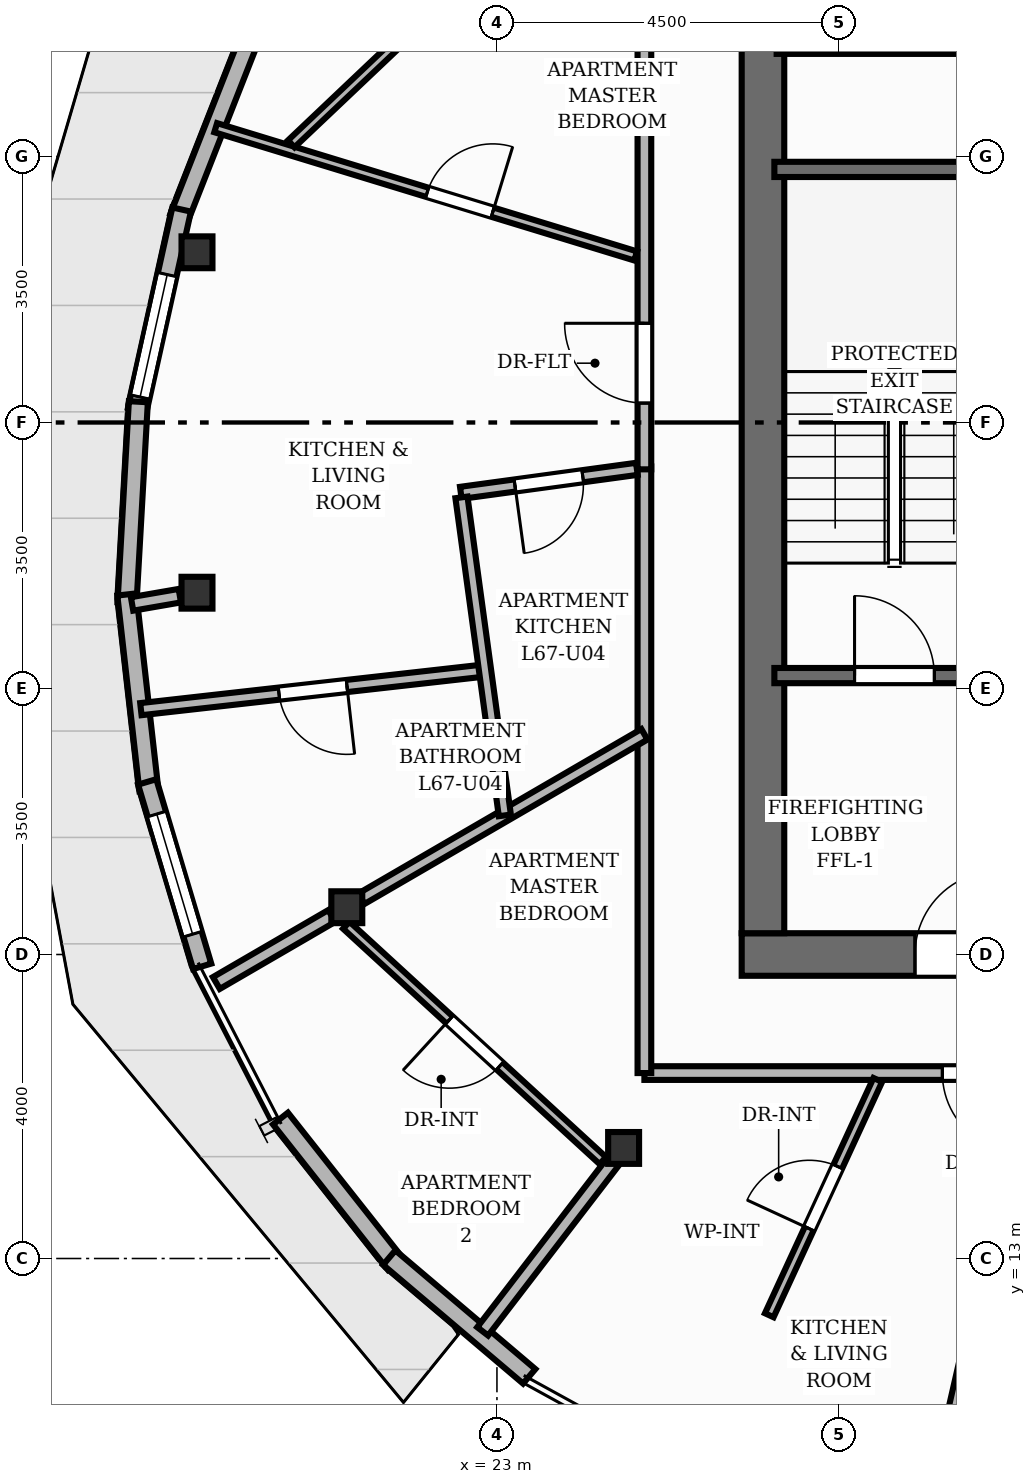
"""IFC4 building model, lengths in metres.
Left out: names, types, materials, properties, quantities, classifications, styles, units other than length and angle.
Written with IfcOpenShell. Run it as: python <this file> out.ifc"""

import sys

from ifc_helpers import new_model, si_unit, direction, frame, frame_2d, origin, origin_2d, place, context, subcontext, project, spatial, rectangle, i_section, extrude, element, fill, save


model = new_model("IFC4")
c1 = context("Model", 3, precision=1e-05, world=origin(), true_north=direction((0.0, 1.0)))
c2 = subcontext(c1, "Body", "Model", "MODEL_VIEW")
j1 = project(units=[si_unit("LENGTHUNIT", "METRE"), si_unit("PLANEANGLEUNIT", "RADIAN")], contexts=[c1])
p1 = place(None, origin())
s1 = spatial("IfcSite", under=j1, at=p1, CompositionType="ELEMENT")
p2 = place(p1, origin())
s2 = spatial("IfcBuilding", under=s1, at=p2, CompositionType="ELEMENT")
p3 = place(p2, frame((0.0, 0.0, 223.84)))
s3 = spatial("IfcBuildingStorey", under=s2, at=p3, CompositionType="ELEMENT", Elevation=223.84)
p4 = place(p3, frame((26.22, 17.0, 0.0), z_axis=(0.0, 0.0, 1.0), x_axis=(1.0, 0.0, 0.0)))
e1 = element("IfcWall", 1, at=p4, inside=s3, PredefinedType="SHEAR", context=c2, shape_type="SweptSolid", body=[
    extrude(rectangle(XDim=11.56, YDim=0.56, at=frame_2d((5.78, 0.0))), origin(), (0.0, 0.0, 1.0), 3.2),
])
p5 = place(p4, frame((2.28, 0.0, 0.0)))
e2 = element("IfcOpeningElement", 2, at=p5, cuts=e1, PredefinedType="OPENING", context=c2, shape_type="SweptSolid", body=[
    extrude(rectangle(XDim=1.1, YDim=2.15, at=frame_2d((0.55, 1.075))), frame((0.0, 0.29, 0.0), z_axis=(0.0, -1.0, 0.0), x_axis=(1.0, 0.0, 0.0)), (0.0, 0.0, 1.0), 0.58),
])
p6 = place(p4, frame((5.83, 0.0, 0.0)))
e3 = element("IfcOpeningElement", 3, at=p6, cuts=e1, PredefinedType="OPENING", context=c2, shape_type="SweptSolid", body=[
    extrude(rectangle(XDim=0.9, YDim=2.1, at=frame_2d((0.45, 1.05))), frame((0.0, 0.29, 0.0), z_axis=(0.0, -1.0, 0.0), x_axis=(1.0, 0.0, 0.0)), (0.0, 0.0, 1.0), 0.58),
])
p7 = place(p3, frame((26.5, 17.28, 0.0), z_axis=(0.0, 0.0, 1.0), x_axis=(0.0, 1.0, 0.0)))
e4 = element("IfcWall", 4, at=p7, inside=s3, PredefinedType="SHEAR", context=c2, shape_type="SweptSolid", body=[
    extrude(rectangle(XDim=13.44, YDim=0.56, at=frame_2d((6.72, 0.0))), origin(), (0.0, 0.0, 1.0), 3.2),
])
for number, where, z_axis, x_axis in (
    (5, (19.054, 26.24, 0.0), (0.0, 0.0, 1.0), (1.0, 0.0, 0.0)),
    (6, (19.054, 21.76, 0.0), (0.0, 0.0, 1.0), (1.0, 0.0, 0.0)),
    (7, (21.025, 17.622, 0.0), (0.0, 0.0, 1.0), (1.0, 0.0, 0.0)),
    (8, (24.667, 14.455, 0.0), (0.0, 0.0, 1.0), (1.0, 0.0, 0.0)),
):
    element("IfcColumn", number, at=place(p3, frame(where, z_axis=z_axis, x_axis=x_axis)), inside=s3, PredefinedType="COLUMN", context=c2, shape_type="SweptSolid", body=[
        extrude(i_section(OverallWidth=0.407, OverallDepth=0.419, WebThickness=0.031, FlangeThickness=0.049, at=origin_2d()), origin(), (0.0, 0.0, 1.0), 3.2),
    ])
p8 = place(p3, frame((18.82, 26.698, 0.0), z_axis=(0.0, 0.0, 1.0), x_axis=(0.365588934877, 0.930776412838, 0.0)))
e9 = element("IfcWall", 9, at=p8, inside=s3, PredefinedType="SOLIDWALL", context=c2, shape_type="SweptSolid", body=[
    extrude(rectangle(XDim=2.739, YDim=0.25, at=frame_2d((1.369, 0.0))), origin(), (0.0, 0.0, 1.0), 2.577),
])
p9 = place(p3, frame((18.267, 24.164, 0.0), z_axis=(0.0, 0.0, 1.0), x_axis=(0.21633718885, 0.976318708579, 0.0)))
e10 = element("IfcWall", 10, at=p9, inside=s3, PredefinedType="SOLIDWALL", context=c2, shape_type="SweptSolid", body=[
    extrude(rectangle(XDim=2.702, YDim=0.25, at=frame_2d((1.351, 0.0))), origin(), (0.0, 0.0, 1.0), 2.577),
])
p10 = place(p9, frame((0.175, 0.0, 0.85)))
e11 = element("IfcOpeningElement", 11, at=p10, cuts=e10, PredefinedType="OPENING", context=c2, shape_type="SweptSolid", body=[
    extrude(rectangle(XDim=1.65, YDim=1.55, at=frame_2d((0.825, 0.775))), frame((0.0, 0.135, 0.0), z_axis=(0.0, -1.0, 0.0), x_axis=(1.0, 0.0, 0.0)), (0.0, 0.0, 1.0), 0.27),
])
p11 = place(p3, frame((18.133, 21.626, 0.0), z_axis=(0.0, 0.0, 1.0), x_axis=(0.056270814174, 0.998415542483, 0.0)))
e12 = element("IfcWall", 12, at=p11, inside=s3, PredefinedType="SOLIDWALL", context=c2, shape_type="SweptSolid", body=[
    extrude(rectangle(XDim=2.651, YDim=0.25, at=frame_2d((1.325, 0.0))), origin(), (0.0, 0.0, 1.0), 2.96),
])
p12 = place(p3, frame((18.421, 19.161, 0.0), z_axis=(0.0, 0.0, 1.0), x_axis=(-0.112260931198, 0.993678762642, 0.0)))
e13 = element("IfcWall", 13, at=p12, inside=s3, PredefinedType="SOLIDWALL", context=c2, shape_type="SweptSolid", body=[
    extrude(rectangle(XDim=2.592, YDim=0.25, at=frame_2d((1.296, 0.0))), origin(), (0.0, 0.0, 1.0), 2.96),
])
p13 = place(p3, frame((19.122, 16.844, 0.0), z_axis=(0.0, 0.0, 1.0), x_axis=(-0.285604720301, 0.958347506775, 0.0)))
e14 = element("IfcWall", 14, at=p13, inside=s3, PredefinedType="SOLIDWALL", context=c2, shape_type="SweptSolid", body=[
    extrude(rectangle(XDim=2.532, YDim=0.25, at=frame_2d((1.266, 0.0))), origin(), (0.0, 0.0, 1.0), 2.96),
])
p14 = place(p13, frame((0.441, 0.0, 0.85)))
e15 = element("IfcOpeningElement", 15, at=p14, cuts=e14, PredefinedType="OPENING", context=c2, shape_type="SweptSolid", body=[
    extrude(rectangle(XDim=1.65, YDim=1.55, at=frame_2d((0.825, 0.775))), frame((0.0, 0.135, 0.0), z_axis=(0.0, -1.0, 0.0), x_axis=(1.0, 0.0, 0.0)), (0.0, 0.0, 1.0), 0.27),
])
p15 = place(p3, frame((21.663, 12.929, 0.0), z_axis=(0.0, 0.0, 1.0), x_axis=(-0.619881401672, 0.784695512833, 0.0)))
e16 = element("IfcWall", 16, at=p15, inside=s3, PredefinedType="SOLIDWALL", context=c2, shape_type="SweptSolid", body=[
    extrude(rectangle(XDim=2.437, YDim=0.25, at=frame_2d((1.218, 0.0))), origin(), (0.0, 0.0, 1.0), 2.96),
])
p16 = place(p3, frame((23.425, 11.45, 0.0), z_axis=(0.0, 0.0, 1.0), x_axis=(-0.762614923672, 0.646852748462, 0.0)))
e17 = element("IfcWall", 17, at=p16, inside=s3, PredefinedType="SOLIDWALL", context=c2, shape_type="SweptSolid", body=[
    extrude(rectangle(XDim=2.415, YDim=0.25, at=frame_2d((1.208, 0.0))), origin(), (0.0, 0.0, 1.0), 2.96),
])
p17 = place(p3, frame((26.65, 27.33, 0.0), z_axis=(0.0, 0.0, 1.0), x_axis=(1.0, 0.0, 0.0)))
e18 = element("IfcWall", 18, at=p17, inside=s3, PredefinedType="SHEAR", context=c2, shape_type="SweptSolid", body=[
    extrude(rectangle(XDim=3.24, YDim=0.2, at=frame_2d((1.62, 0.0))), origin(), (0.0, 0.0, 1.0), 3.2),
])
p18 = place(p3, frame((26.65, 20.67, 0.0), z_axis=(0.0, 0.0, 1.0), x_axis=(1.0, 0.0, 0.0)))
e19 = element("IfcWall", 19, at=p18, inside=s3, PredefinedType="SHEAR", context=c2, shape_type="SweptSolid", body=[
    extrude(rectangle(XDim=3.24, YDim=0.2, at=frame_2d((1.62, 0.0))), origin(), (0.0, 0.0, 1.0), 3.2),
])
p19 = place(p18, frame((1.055, 0.0, 0.0)))
e20 = element("IfcOpeningElement", 20, at=p19, cuts=e19, PredefinedType="OPENING", context=c2, shape_type="SweptSolid", body=[
    extrude(rectangle(XDim=1.05, YDim=2.15, at=frame_2d((0.525, 1.075))), frame((0.0, 0.11, 0.0), z_axis=(0.0, -1.0, 0.0), x_axis=(1.0, 0.0, 0.0)), (0.0, 0.0, 1.0), 0.22),
])
p20 = place(p3, frame((26.68, 28.95, 0.0), z_axis=(0.0, 0.0, 1.0), x_axis=(1.0, 0.0, 0.0)))
e21 = element("IfcWall", 21, at=p20, inside=s3, PredefinedType="SHEAR", context=c2, shape_type="SweptSolid", body=[
    extrude(rectangle(XDim=5.24, YDim=0.2, at=frame_2d((2.62, 0.0))), origin(), (0.0, 0.0, 1.0), 3.2),
])
p21 = place(p3, frame((18.827, 21.721, 0.0), z_axis=(0.0, 0.0, 1.0), x_axis=(-0.985371537423, -0.170419873359, 0.0)))
e22 = element("IfcWall", 22, at=p21, inside=s3, PredefinedType="PARTITIONING", context=c2, shape_type="SweptSolid", body=[
    extrude(rectangle(XDim=0.637, YDim=0.18, at=frame_2d((0.319, 0.0))), origin(), (0.0, 0.0, 1.0), 2.403),
])
p22 = place(p3, frame((20.826, 17.507, 0.0), z_axis=(0.0, 0.0, 1.0), x_axis=(-0.864599922959, -0.502460917106, 0.0)))
e23 = element("IfcWall", 23, at=p22, inside=s3, PredefinedType="PARTITIONING", context=c2, shape_type="SweptSolid", body=[
    extrude(rectangle(XDim=1.756, YDim=0.18, at=frame_2d((0.878, 0.0))), origin(), (0.0, 0.0, 1.0), 2.403),
])
p23 = place(p3, frame((24.527, 14.273, 0.0), z_axis=(0.0, 0.0, 1.0), x_axis=(-0.609232660573, -0.792991529142, 0.0)))
e24 = element("IfcWall", 24, at=p23, inside=s3, PredefinedType="PARTITIONING", context=c2, shape_type="SweptSolid", body=[
    extrude(rectangle(XDim=2.814, YDim=0.18, at=frame_2d((1.407, 0.0))), origin(), (0.0, 0.0, 1.0), 2.403),
])
p24 = place(p3, frame((29.374, 12.517, 0.0), z_axis=(0.0, 0.0, 1.0), x_axis=(-0.22291168124, -0.974838644272, 0.0)))
e25 = element("IfcWall", 25, at=p24, inside=s3, PredefinedType="PARTITIONING", context=c2, shape_type="SweptSolid", body=[
    extrude(rectangle(XDim=2.976, YDim=0.18, at=frame_2d((1.488, 0.0))), origin(), (0.0, 0.0, 1.0), 2.403),
])
p25 = place(p3, frame((30.74, 15.44, 0.0), z_axis=(0.0, 0.0, 1.0), x_axis=(-1.0, 0.0, 0.0)))
e26 = element("IfcWall", 26, at=p25, inside=s3, PredefinedType="PARTITIONING", context=c2, shape_type="SweptSolid", body=[
    extrude(rectangle(XDim=5.8, YDim=0.18, at=frame_2d((2.9, 0.0))), origin(), (0.0, 0.0, 1.0), 2.955),
])
p26 = place(p25, frame((0.83, 0.0, 0.0)))
e27 = element("IfcOpeningElement", 27, at=p26, cuts=e26, PredefinedType="OPENING", context=c2, shape_type="SweptSolid", body=[
    extrude(rectangle(XDim=1.05, YDim=2.15, at=frame_2d((0.525, 1.075))), frame((0.0, 0.1, 0.0), z_axis=(0.0, -1.0, 0.0), x_axis=(1.0, 0.0, 0.0)), (0.0, 0.0, 1.0), 0.2),
])
p27 = place(p3, frame((24.94, 15.44, 0.0), z_axis=(0.0, 0.0, 1.0), x_axis=(0.0, 1.0, 0.0)))
e28 = element("IfcWall", 28, at=p27, inside=s3, PredefinedType="PARTITIONING", context=c2, shape_type="SweptSolid", body=[
    extrude(rectangle(XDim=7.982, YDim=0.18, at=frame_2d((3.991, 0.0))), origin(), (0.0, 0.0, 1.0), 2.955),
])
p28 = place(p3, frame((24.94, 23.384, 0.0), z_axis=(0.0, 0.0, 1.0), x_axis=(0.0, 1.0, 0.0)))
e29 = element("IfcWall", 29, at=p28, inside=s3, PredefinedType="PARTITIONING", context=c2, shape_type="SweptSolid", body=[
    extrude(rectangle(XDim=9.177, YDim=0.18, at=frame_2d((4.588, 0.0))), origin(), (0.0, 0.0, 1.0), 2.955),
])
p29 = place(p28, frame((0.872, 0.0, 0.0)))
e30 = element("IfcOpeningElement", 30, at=p29, cuts=e29, PredefinedType="OPENING", context=c2, shape_type="SweptSolid", body=[
    extrude(rectangle(XDim=1.05, YDim=2.15, at=frame_2d((0.525, 1.075))), frame((0.0, 0.1, 0.0), z_axis=(0.0, -1.0, 0.0), x_axis=(1.0, 0.0, 0.0)), (0.0, 0.0, 1.0), 0.2),
])
p30 = place(p3, frame((26.583, 12.253, 0.0), z_axis=(0.0, 0.0, 1.0), x_axis=(0.41880384085, 0.908076727424, 0.0)))
e31 = element("IfcWall", 31, at=p30, inside=s3, PredefinedType="PARTITIONING", context=c2, shape_type="SweptSolid", body=[
    extrude(rectangle(XDim=3.409, YDim=0.125, at=frame_2d((1.705, 0.0))), origin(), (0.0, 0.0, 1.0), 2.955),
])
p31 = place(p30, frame((1.255, 0.0, 0.0)))
e32 = element("IfcOpeningElement", 32, at=p31, cuts=e31, PredefinedType="OPENING", context=c2, shape_type="SweptSolid", body=[
    extrude(rectangle(XDim=0.9, YDim=2.1, at=frame_2d((0.45, 1.05))), frame((0.0, 0.073, 0.0), z_axis=(0.0, -1.0, 0.0), x_axis=(1.0, 0.0, 0.0)), (0.0, 0.0, 1.0), 0.145),
])
p32 = place(p3, frame((24.393, 14.288, 0.0), z_axis=(0.0, 0.0, 1.0), x_axis=(-0.736828890574, 0.676079274949, 0.0)))
e33 = element("IfcWall", 33, at=p32, inside=s3, PredefinedType="PARTITIONING", context=c2, shape_type="SweptSolid", body=[
    extrude(rectangle(XDim=4.582, YDim=0.125, at=frame_2d((2.291, 0.0))), origin(), (0.0, 0.0, 1.0), 2.488),
])
p33 = place(p32, frame((1.841, 0.0, 0.0)))
e34 = element("IfcOpeningElement", 34, at=p33, cuts=e33, PredefinedType="OPENING", context=c2, shape_type="SweptSolid", body=[
    extrude(rectangle(XDim=0.9, YDim=2.1, at=frame_2d((0.45, 1.05))), frame((0.0, 0.073, 0.0), z_axis=(0.0, -1.0, 0.0), x_axis=(1.0, 0.0, 0.0)), (0.0, 0.0, 1.0), 0.145),
])
p34 = place(p3, frame((21.218, 17.734, 0.0), z_axis=(0.0, 0.0, 1.0), x_axis=(0.864618907014, 0.502428249239, 0.0)))
e35 = element("IfcWall", 35, at=p34, inside=s3, PredefinedType="PLUMBINGWALL", context=c2, shape_type="SweptSolid", body=[
    extrude(rectangle(XDim=4.305, YDim=0.16, at=frame_2d((2.153, 0.0))), origin(), (0.0, 0.0, 1.0), 2.403),
])
p35 = place(p3, frame((22.844, 20.738, 0.0), z_axis=(0.0, 0.0, 1.0), x_axis=(-0.993735184374, -0.111760383578, 0.0)))
e36 = element("IfcWall", 36, at=p35, inside=s3, PredefinedType="PLUMBINGWALL", context=c2, shape_type="SweptSolid", body=[
    extrude(rectangle(XDim=4.557, YDim=0.16, at=frame_2d((2.278, 0.0))), origin(), (0.0, 0.0, 1.0), 2.692),
])
p36 = place(p35, frame((1.829, 0.0, 0.0)))
e37 = element("IfcOpeningElement", 37, at=p36, cuts=e36, PredefinedType="OPENING", context=c2, shape_type="SweptSolid", body=[
    extrude(rectangle(XDim=0.9, YDim=2.1, at=frame_2d((0.45, 1.05))), frame((0.0, 0.09, 0.0), z_axis=(0.0, -1.0, 0.0), x_axis=(1.0, 0.0, 0.0)), (0.0, 0.0, 1.0), 0.18),
])
p37 = place(p3, frame((19.3, 27.879, 0.0), z_axis=(0.0, 0.0, 1.0), x_axis=(0.956379122361, -0.29212835246, 0.0)))
e38 = element("IfcWall", 38, at=p37, inside=s3, PredefinedType="PARTITIONING", context=c2, shape_type="SweptSolid", body=[
    extrude(rectangle(XDim=5.777, YDim=0.125, at=frame_2d((2.889, 0.0))), origin(), (0.0, 0.0, 1.0), 2.692),
])
p38 = place(p37, frame((2.91, 0.0, 0.0)))
e39 = element("IfcOpeningElement", 39, at=p38, cuts=e38, PredefinedType="OPENING", context=c2, shape_type="SweptSolid", body=[
    extrude(rectangle(XDim=0.9, YDim=2.1, at=frame_2d((0.45, 1.05))), frame((0.0, 0.073, 0.0), z_axis=(0.0, -1.0, 0.0), x_axis=(1.0, 0.0, 0.0)), (0.0, 0.0, 1.0), 0.145),
])
p39 = place(p3, frame((24.841, 23.39, 0.0), z_axis=(0.0, 0.0, 1.0), x_axis=(-0.990823810893, -0.135159815654, 0.0)))
e40 = element("IfcWall", 40, at=p39, inside=s3, PredefinedType="PLUMBINGWALL", context=c2, shape_type="SweptSolid", body=[
    extrude(rectangle(XDim=2.337, YDim=0.16, at=frame_2d((1.169, 0.0))), origin(), (0.0, 0.0, 1.0), 2.692),
])
p40 = place(p39, frame((0.719, 0.0, 0.0)))
e41 = element("IfcOpeningElement", 41, at=p40, cuts=e40, PredefinedType="OPENING", context=c2, shape_type="SweptSolid", body=[
    extrude(rectangle(XDim=0.9, YDim=2.1, at=frame_2d((0.45, 1.05))), frame((0.0, 0.09, 0.0), z_axis=(0.0, -1.0, 0.0), x_axis=(1.0, 0.0, 0.0)), (0.0, 0.0, 1.0), 0.18),
])
p41 = place(p3, frame((22.533, 23.015, 0.0), z_axis=(0.0, 0.0, 1.0), x_axis=(0.135218975067, -0.990815739066, 0.0)))
e42 = element("IfcWall", 42, at=p41, inside=s3, PredefinedType="PLUMBINGWALL", context=c2, shape_type="SweptSolid", body=[
    extrude(rectangle(XDim=4.223, YDim=0.16, at=frame_2d((2.112, 0.0))), origin(), (0.0, 0.0, 1.0), 2.955),
])
p42 = place(p3, frame((20.293, 27.667, 0.0), z_axis=(0.0, 0.0, 1.0), x_axis=(0.725799476315, 0.687906330965, 0.0)))
e43 = element("IfcWall", 43, at=p42, inside=s3, PredefinedType="PARTITIONING", context=c2, shape_type="SweptSolid", body=[
    extrude(rectangle(XDim=6.282, YDim=0.125, at=frame_2d((3.141, 0.0))), origin(), (0.0, 0.0, 1.0), 2.955),
])
p43 = place(p42, frame((2.691, 0.0, 0.0)))
e44 = element("IfcOpeningElement", 44, at=p43, cuts=e43, PredefinedType="OPENING", context=c2, shape_type="SweptSolid", body=[
    extrude(rectangle(XDim=0.9, YDim=2.1, at=frame_2d((0.45, 1.05))), frame((0.0, 0.073, 0.0), z_axis=(0.0, -1.0, 0.0), x_axis=(1.0, 0.0, 0.0)), (0.0, 0.0, 1.0), 0.145),
])
p44 = place(p10, origin())
e45 = element("IfcWindow", 45, at=p44, inside=s3, PartitioningType="SINGLE_PANEL", PredefinedType="WINDOW", context=c2, shape_type="SweptSolid", body=[
    extrude(rectangle(XDim=1.65, YDim=1.55, at=frame_2d((0.825, 0.775))), frame((0.0, 0.03, 0.0), z_axis=(0.0, -1.0, 0.0), x_axis=(1.0, 0.0, 0.0)), (0.0, 0.0, 1.0), 0.06),
])
fill(e11, e45)
p45 = place(p14, origin())
e46 = element("IfcWindow", 46, at=p45, inside=s3, PartitioningType="SINGLE_PANEL", PredefinedType="WINDOW", context=c2, shape_type="SweptSolid", body=[
    extrude(rectangle(XDim=1.65, YDim=1.55, at=frame_2d((0.825, 0.775))), frame((0.0, 0.03, 0.0), z_axis=(0.0, -1.0, 0.0), x_axis=(1.0, 0.0, 0.0)), (0.0, 0.0, 1.0), 0.06),
])
fill(e15, e46)
p46 = place(p19, origin())
e47 = element("IfcDoor", 47, at=p46, inside=s3, OperationType="SINGLE_SWING_LEFT", PredefinedType="DOOR", context=c2, shape_type="SweptSolid", body=[
    extrude(rectangle(XDim=1.05, YDim=2.15, at=frame_2d((0.525, 1.075))), frame((0.0, 0.025, 0.0), z_axis=(0.0, -1.0, 0.0), x_axis=(1.0, 0.0, 0.0)), (0.0, 0.0, 1.0), 0.05),
])
fill(e20, e47)
p47 = place(p5, origin())
e48 = element("IfcDoor", 48, at=p47, inside=s3, OperationType="SINGLE_SWING_RIGHT", PredefinedType="DOOR", context=c2, shape_type="SweptSolid", body=[
    extrude(rectangle(XDim=1.1, YDim=2.15, at=frame_2d((0.55, 1.075))), frame((0.0, 0.025, 0.0), z_axis=(0.0, -1.0, 0.0), x_axis=(1.0, 0.0, 0.0)), (0.0, 0.0, 1.0), 0.05),
])
fill(e2, e48)
p48 = place(p26, origin())
e49 = element("IfcDoor", 49, at=p48, inside=s3, OperationType="SINGLE_SWING_LEFT", PredefinedType="DOOR", context=c2, shape_type="SweptSolid", body=[
    extrude(rectangle(XDim=1.05, YDim=2.15, at=frame_2d((0.525, 1.075))), frame((0.0, 0.025, 0.0), z_axis=(0.0, -1.0, 0.0), x_axis=(1.0, 0.0, 0.0)), (0.0, 0.0, 1.0), 0.05),
])
fill(e27, e49)
p49 = place(p31, origin())
e50 = element("IfcDoor", 50, at=p49, inside=s3, OperationType="SINGLE_SWING_LEFT", PredefinedType="DOOR", context=c2, shape_type="SweptSolid", body=[
    extrude(rectangle(XDim=0.9, YDim=2.1, at=frame_2d((0.45, 1.05))), frame((0.0, 0.025, 0.0), z_axis=(0.0, -1.0, 0.0), x_axis=(1.0, 0.0, 0.0)), (0.0, 0.0, 1.0), 0.05),
])
fill(e32, e50)
p50 = place(p33, origin())
e51 = element("IfcDoor", 51, at=p50, inside=s3, OperationType="SINGLE_SWING_RIGHT", PredefinedType="DOOR", context=c2, shape_type="SweptSolid", body=[
    extrude(rectangle(XDim=0.9, YDim=2.1, at=frame_2d((0.45, 1.05))), frame((0.0, 0.025, 0.0), z_axis=(0.0, -1.0, 0.0), x_axis=(1.0, 0.0, 0.0)), (0.0, 0.0, 1.0), 0.05),
])
fill(e34, e51)
p51 = place(p29, origin())
e52 = element("IfcDoor", 52, at=p51, inside=s3, OperationType="SINGLE_SWING_RIGHT", PredefinedType="DOOR", context=c2, shape_type="SweptSolid", body=[
    extrude(rectangle(XDim=1.05, YDim=2.15, at=frame_2d((0.525, 1.075))), frame((0.0, 0.025, 0.0), z_axis=(0.0, -1.0, 0.0), x_axis=(1.0, 0.0, 0.0)), (0.0, 0.0, 1.0), 0.05),
])
fill(e30, e52)
p52 = place(p36, origin())
e53 = element("IfcDoor", 53, at=p52, inside=s3, OperationType="SINGLE_SWING_LEFT", PredefinedType="DOOR", context=c2, shape_type="SweptSolid", body=[
    extrude(rectangle(XDim=0.9, YDim=2.1, at=frame_2d((0.45, 1.05))), frame((0.0, 0.025, 0.0), z_axis=(0.0, -1.0, 0.0), x_axis=(1.0, 0.0, 0.0)), (0.0, 0.0, 1.0), 0.05),
])
fill(e37, e53)
p53 = place(p38, origin())
e54 = element("IfcDoor", 54, at=p53, inside=s3, OperationType="SINGLE_SWING_RIGHT", PredefinedType="DOOR", context=c2, shape_type="SweptSolid", body=[
    extrude(rectangle(XDim=0.9, YDim=2.1, at=frame_2d((0.45, 1.05))), frame((0.0, 0.025, 0.0), z_axis=(0.0, -1.0, 0.0), x_axis=(1.0, 0.0, 0.0)), (0.0, 0.0, 1.0), 0.05),
])
fill(e39, e54)
p54 = place(p40, origin())
e55 = element("IfcDoor", 55, at=p54, inside=s3, OperationType="SINGLE_SWING_RIGHT", PredefinedType="DOOR", context=c2, shape_type="SweptSolid", body=[
    extrude(rectangle(XDim=0.9, YDim=2.1, at=frame_2d((0.45, 1.05))), frame((0.0, 0.025, 0.0), z_axis=(0.0, -1.0, 0.0), x_axis=(1.0, 0.0, 0.0)), (0.0, 0.0, 1.0), 0.05),
])
fill(e41, e55)
save(model, sys.argv[1])
